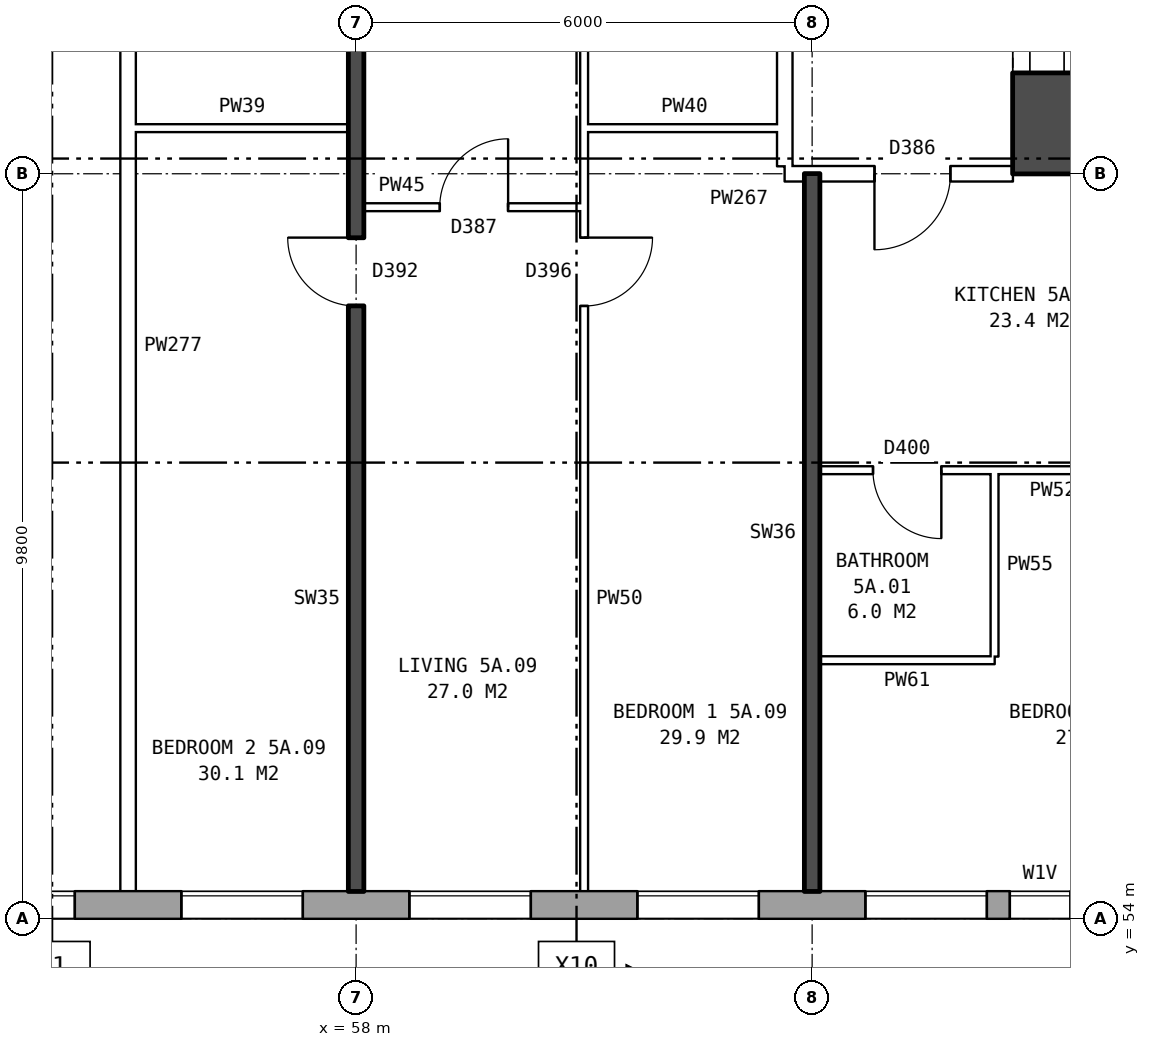
"""IFC4 building model, lengths in metres.
Left out: names, types, materials, properties, quantities, classifications, styles, units other than length and angle.
Written with IfcOpenShell. Run it as: python <this file> out.ifc"""

import sys

from ifc_helpers import new_model, si_unit, direction, frame, frame_2d, origin, place, context, subcontext, project, spatial, rectangle, extrude, element, fill, save


model = new_model("IFC4")
c1 = context("Model", 3, precision=1e-05, world=origin(), true_north=direction((0.0, 1.0)))
c2 = subcontext(c1, "Body", "Model", "MODEL_VIEW")
j1 = project(units=[si_unit("LENGTHUNIT", "METRE"), si_unit("PLANEANGLEUNIT", "RADIAN")], contexts=[c1])
p1 = place(None, origin())
s1 = spatial("IfcSite", under=j1, at=p1, CompositionType="ELEMENT")
p2 = place(p1, origin())
s2 = spatial("IfcBuilding", under=s1, at=p2, CompositionType="ELEMENT")
p3 = place(p2, frame((0.0, 0.0, 22.6)))
s3 = spatial("IfcBuildingStorey", under=s2, at=p3, CompositionType="ELEMENT", Elevation=22.6)
p4 = place(p3, frame((22.825, 54.18, 0.0), z_axis=(0.0, 0.0, 1.0), x_axis=(1.0, 0.0, 0.0)))
e1 = element("IfcWall", 1, at=p4, inside=s3, PredefinedType="STANDARD", context=c2, shape_type="SweptSolid", body=[
    extrude(rectangle(XDim=50.101, YDim=0.36, at=frame_2d((25.05, 0.0))), origin(), (0.0, 0.0, 1.0), 2.85),
])
p5 = place(p4, frame((0.3, 0.0, 0.8)))
e2 = element("IfcOpeningElement", 2, at=p5, cuts=e1, PredefinedType="OPENING", context=c2, shape_type="SweptSolid", body=[
    extrude(rectangle(XDim=1.4, YDim=1.8, at=frame_2d((0.7, 0.9))), frame((0.0, 0.19, 0.0), z_axis=(0.0, -1.0, 0.0), x_axis=(1.0, 0.0, 0.0)), (0.0, 0.0, 1.0), 0.38),
])
p6 = place(p4, frame((5.475, 0.0, 0.8)))
e3 = element("IfcOpeningElement", 3, at=p6, cuts=e1, PredefinedType="OPENING", context=c2, shape_type="SweptSolid", body=[
    extrude(rectangle(XDim=1.2, YDim=0.9, at=frame_2d((0.6, 0.45))), frame((0.0, 0.19, 0.0), z_axis=(0.0, -1.0, 0.0), x_axis=(1.0, 0.0, 0.0)), (0.0, 0.0, 1.0), 0.38),
])
p7 = place(p4, frame((8.875, 0.0, 0.8)))
e4 = element("IfcOpeningElement", 4, at=p7, cuts=e1, PredefinedType="OPENING", context=c2, shape_type="SweptSolid", body=[
    extrude(rectangle(XDim=1.6, YDim=1.8, at=frame_2d((0.8, 0.9))), frame((0.0, 0.19, 0.0), z_axis=(0.0, -1.0, 0.0), x_axis=(1.0, 0.0, 0.0)), (0.0, 0.0, 1.0), 0.38),
])
p8 = place(p4, frame((11.875, 0.0, 0.8)))
e5 = element("IfcOpeningElement", 5, at=p8, cuts=e1, PredefinedType="OPENING", context=c2, shape_type="SweptSolid", body=[
    extrude(rectangle(XDim=1.6, YDim=1.8, at=frame_2d((0.8, 0.9))), frame((0.0, 0.19, 0.0), z_axis=(0.0, -1.0, 0.0), x_axis=(1.0, 0.0, 0.0)), (0.0, 0.0, 1.0), 0.38),
])
p9 = place(p4, frame((14.875, 0.0, 0.8)))
e6 = element("IfcOpeningElement", 6, at=p9, cuts=e1, PredefinedType="OPENING", context=c2, shape_type="SweptSolid", body=[
    extrude(rectangle(XDim=1.6, YDim=1.8, at=frame_2d((0.8, 0.9))), frame((0.0, 0.19, 0.0), z_axis=(0.0, -1.0, 0.0), x_axis=(1.0, 0.0, 0.0)), (0.0, 0.0, 1.0), 0.38),
])
p10 = place(p4, frame((17.875, 0.0, 0.8)))
e7 = element("IfcOpeningElement", 7, at=p10, cuts=e1, PredefinedType="OPENING", context=c2, shape_type="SweptSolid", body=[
    extrude(rectangle(XDim=1.6, YDim=1.8, at=frame_2d((0.8, 0.9))), frame((0.0, 0.19, 0.0), z_axis=(0.0, -1.0, 0.0), x_axis=(1.0, 0.0, 0.0)), (0.0, 0.0, 1.0), 0.38),
])
p11 = place(p4, frame((20.875, 0.0, 0.8)))
e8 = element("IfcOpeningElement", 8, at=p11, cuts=e1, PredefinedType="OPENING", context=c2, shape_type="SweptSolid", body=[
    extrude(rectangle(XDim=1.6, YDim=1.8, at=frame_2d((0.8, 0.9))), frame((0.0, 0.19, 0.0), z_axis=(0.0, -1.0, 0.0), x_axis=(1.0, 0.0, 0.0)), (0.0, 0.0, 1.0), 0.38),
])
p12 = place(p4, frame((23.875, 0.0, 0.8)))
e9 = element("IfcOpeningElement", 9, at=p12, cuts=e1, PredefinedType="OPENING", context=c2, shape_type="SweptSolid", body=[
    extrude(rectangle(XDim=1.6, YDim=1.8, at=frame_2d((0.8, 0.9))), frame((0.0, 0.19, 0.0), z_axis=(0.0, -1.0, 0.0), x_axis=(1.0, 0.0, 0.0)), (0.0, 0.0, 1.0), 0.38),
])
p13 = place(p4, frame((26.875, 0.0, 0.8)))
e10 = element("IfcOpeningElement", 10, at=p13, cuts=e1, PredefinedType="OPENING", context=c2, shape_type="SweptSolid", body=[
    extrude(rectangle(XDim=1.6, YDim=1.8, at=frame_2d((0.8, 0.9))), frame((0.0, 0.19, 0.0), z_axis=(0.0, -1.0, 0.0), x_axis=(1.0, 0.0, 0.0)), (0.0, 0.0, 1.0), 0.38),
])
p14 = place(p4, frame((29.875, 0.0, 0.8)))
e11 = element("IfcOpeningElement", 11, at=p14, cuts=e1, PredefinedType="OPENING", context=c2, shape_type="SweptSolid", body=[
    extrude(rectangle(XDim=1.6, YDim=1.8, at=frame_2d((0.8, 0.9))), frame((0.0, 0.19, 0.0), z_axis=(0.0, -1.0, 0.0), x_axis=(1.0, 0.0, 0.0)), (0.0, 0.0, 1.0), 0.38),
])
p15 = place(p4, frame((32.875, 0.0, 0.8)))
e12 = element("IfcOpeningElement", 12, at=p15, cuts=e1, PredefinedType="OPENING", context=c2, shape_type="SweptSolid", body=[
    extrude(rectangle(XDim=1.6, YDim=1.8, at=frame_2d((0.8, 0.9))), frame((0.0, 0.19, 0.0), z_axis=(0.0, -1.0, 0.0), x_axis=(1.0, 0.0, 0.0)), (0.0, 0.0, 1.0), 0.38),
])
p16 = place(p4, frame((35.875, 0.0, 0.8)))
e13 = element("IfcOpeningElement", 13, at=p16, cuts=e1, PredefinedType="OPENING", context=c2, shape_type="SweptSolid", body=[
    extrude(rectangle(XDim=1.6, YDim=1.8, at=frame_2d((0.8, 0.9))), frame((0.0, 0.19, 0.0), z_axis=(0.0, -1.0, 0.0), x_axis=(1.0, 0.0, 0.0)), (0.0, 0.0, 1.0), 0.38),
])
p17 = place(p4, frame((38.875, 0.0, 0.8)))
e14 = element("IfcOpeningElement", 14, at=p17, cuts=e1, PredefinedType="OPENING", context=c2, shape_type="SweptSolid", body=[
    extrude(rectangle(XDim=1.6, YDim=1.8, at=frame_2d((0.8, 0.9))), frame((0.0, 0.19, 0.0), z_axis=(0.0, -1.0, 0.0), x_axis=(1.0, 0.0, 0.0)), (0.0, 0.0, 1.0), 0.38),
])
p18 = place(p4, frame((41.875, 0.0, 0.8)))
e15 = element("IfcOpeningElement", 15, at=p18, cuts=e1, PredefinedType="OPENING", context=c2, shape_type="SweptSolid", body=[
    extrude(rectangle(XDim=1.6, YDim=1.8, at=frame_2d((0.8, 0.9))), frame((0.0, 0.19, 0.0), z_axis=(0.0, -1.0, 0.0), x_axis=(1.0, 0.0, 0.0)), (0.0, 0.0, 1.0), 0.38),
])
p19 = place(p4, frame((43.775, 0.0, 0.8)))
e16 = element("IfcOpeningElement", 16, at=p19, cuts=e1, PredefinedType="OPENING", context=c2, shape_type="SweptSolid", body=[
    extrude(rectangle(XDim=0.8, YDim=0.9, at=frame_2d((0.4, 0.45))), frame((0.0, 0.19, 0.0), z_axis=(0.0, -1.0, 0.0), x_axis=(1.0, 0.0, 0.0)), (0.0, 0.0, 1.0), 0.38),
])
p20 = place(p4, frame((47.875, 0.0, 0.8)))
e17 = element("IfcOpeningElement", 17, at=p20, cuts=e1, PredefinedType="OPENING", context=c2, shape_type="SweptSolid", body=[
    extrude(rectangle(XDim=1.6, YDim=1.8, at=frame_2d((0.8, 0.9))), frame((0.0, 0.19, 0.0), z_axis=(0.0, -1.0, 0.0), x_axis=(1.0, 0.0, 0.0)), (0.0, 0.0, 1.0), 0.38),
])
p21 = place(p4, frame((2.0, 0.0, 0.9)))
e18 = element("IfcOpeningElement", 18, at=p21, cuts=e1, PredefinedType="OPENING", context=c2, shape_type="SweptSolid", body=[
    extrude(rectangle(XDim=0.8, YDim=1.5, at=frame_2d((0.4, 0.75))), frame((0.0, 0.19, 0.0), z_axis=(0.0, -1.0, 0.0), x_axis=(1.0, 0.0, 0.0)), (0.0, 0.0, 1.0), 0.38),
])
p22 = place(p4, frame((6.975, 0.0, 0.8)))
e19 = element("IfcOpeningElement", 19, at=p22, cuts=e1, PredefinedType="OPENING", context=c2, shape_type="SweptSolid", body=[
    extrude(rectangle(XDim=1.4, YDim=1.8, at=frame_2d((0.7, 0.9))), frame((0.0, 0.19, 0.0), z_axis=(0.0, -1.0, 0.0), x_axis=(1.0, 0.0, 0.0)), (0.0, 0.0, 1.0), 0.38),
])
p23 = place(p4, frame((46.075, 0.0, 1.7)))
e20 = element("IfcOpeningElement", 20, at=p23, cuts=e1, PredefinedType="OPENING", context=c2, shape_type="SweptSolid", body=[
    extrude(rectangle(XDim=0.8, YDim=0.9, at=frame_2d((0.4, 0.45))), frame((0.0, 0.19, 0.0), z_axis=(0.0, -1.0, 0.0), x_axis=(1.0, 0.0, 0.0)), (0.0, 0.0, 1.0), 0.38),
])
p24 = place(p3, frame((67.09, 64.7, 0.0), z_axis=(0.0, 0.0, 1.0), x_axis=(0.0, 1.0, 0.0)))
e21 = element("IfcWall", 21, at=p24, inside=s3, PredefinedType="SHEAR", context=c2, shape_type="SweptSolid", body=[
    extrude(rectangle(XDim=10.6, YDim=0.9, at=frame_2d((5.3, 0.0))), origin(), (0.0, 0.0, 1.0), 2.85),
])
p25 = place(p24, frame((0.425, 0.0, 0.0)))
e22 = element("IfcOpeningElement", 22, at=p25, cuts=e21, PredefinedType="OPENING", context=c2, shape_type="SweptSolid", body=[
    extrude(rectangle(XDim=1.1, YDim=2.1, at=frame_2d((0.55, 1.05))), frame((0.0, 0.46, 0.0), z_axis=(0.0, -1.0, 0.0), x_axis=(1.0, 0.0, 0.0)), (0.0, 0.0, 1.0), 0.92),
])
p26 = place(p24, frame((9.0, 0.0, 0.0)))
e23 = element("IfcOpeningElement", 23, at=p26, cuts=e21, PredefinedType="OPENING", context=c2, shape_type="SweptSolid", body=[
    extrude(rectangle(XDim=1.1, YDim=2.1, at=frame_2d((0.55, 1.05))), frame((0.0, 0.46, 0.0), z_axis=(0.0, -1.0, 0.0), x_axis=(1.0, 0.0, 0.0)), (0.0, 0.0, 1.0), 0.92),
])
p27 = place(p3, frame((66.64, 64.25, 0.0), z_axis=(0.0, 0.0, 1.0), x_axis=(1.0, 0.0, 0.0)))
e24 = element("IfcWall", 24, at=p27, inside=s3, PredefinedType="SHEAR", context=c2, shape_type="SweptSolid", body=[
    extrude(rectangle(XDim=9.0, YDim=0.9, at=frame_2d((4.5, 0.0))), origin(), (0.0, 0.0, 1.0), 2.85),
])
p28 = place(p3, frame((63.64, 63.9, 0.0), z_axis=(0.0, 0.0, 1.0), x_axis=(0.0, 1.0, 0.0)))
e25 = element("IfcWall", 25, at=p28, inside=s3, PredefinedType="PARTITIONING", context=c2, shape_type="SweptSolid", body=[
    extrude(rectangle(XDim=12.2, YDim=0.2, at=frame_2d((6.1, 0.0))), origin(), (0.0, 0.0, 1.0), 2.85),
])
p29 = place(p28, frame((5.1, 0.0, 0.0)))
e26 = element("IfcOpeningElement", 26, at=p29, cuts=e25, PredefinedType="OPENING", context=c2, shape_type="SweptSolid", body=[
    extrude(rectangle(XDim=2.0, YDim=2.1, at=frame_2d((1.0, 1.05))), frame((0.0, 0.11, 0.0), z_axis=(0.0, -1.0, 0.0), x_axis=(1.0, 0.0, 0.0)), (0.0, 0.0, 1.0), 0.22),
])
p30 = place(p3, frame((64.1, 57.4, 0.0), z_axis=(0.0, 0.0, 1.0), x_axis=(1.0, 0.0, 0.0)))
e27 = element("IfcWall", 27, at=p30, inside=s3, PredefinedType="PARTITIONING", context=c2, shape_type="SweptSolid", body=[
    extrude(rectangle(XDim=2.3, YDim=0.1, at=frame_2d((1.15, 0.0))), origin(), (0.0, 0.0, 1.0), 2.85),
])
p31 = place(p3, frame((64.1, 59.9, 0.0), z_axis=(0.0, 0.0, 1.0), x_axis=(1.0, 0.0, 0.0)))
e28 = element("IfcWall", 28, at=p31, inside=s3, PredefinedType="PARTITIONING", context=c2, shape_type="SweptSolid", body=[
    extrude(rectangle(XDim=5.8, YDim=0.1, at=frame_2d((2.9, 0.0))), origin(), (0.0, 0.0, 1.0), 2.85),
])
p32 = place(p31, frame((3.6, 0.0, 0.0)))
e29 = element("IfcOpeningElement", 29, at=p32, cuts=e28, PredefinedType="OPENING", context=c2, shape_type="SweptSolid", body=[
    extrude(rectangle(XDim=0.9, YDim=2.1, at=frame_2d((0.45, 1.05))), frame((0.0, 0.06, 0.0), z_axis=(0.0, -1.0, 0.0), x_axis=(1.0, 0.0, 0.0)), (0.0, 0.0, 1.0), 0.12),
])
p33 = place(p31, frame((0.7, 0.0, 0.0)))
e30 = element("IfcOpeningElement", 30, at=p33, cuts=e28, PredefinedType="OPENING", context=c2, shape_type="SweptSolid", body=[
    extrude(rectangle(XDim=0.9, YDim=2.1, at=frame_2d((0.45, 1.05))), frame((0.0, 0.06, 0.0), z_axis=(0.0, -1.0, 0.0), x_axis=(1.0, 0.0, 0.0)), (0.0, 0.0, 1.0), 0.12),
])
p34 = place(p3, frame((58.1, 63.36, 0.0), z_axis=(0.0, 0.0, 1.0), x_axis=(1.0, 0.0, 0.0)))
e31 = element("IfcWall", 31, at=p34, inside=s3, PredefinedType="PARTITIONING", context=c2, shape_type="SweptSolid", body=[
    extrude(rectangle(XDim=2.9, YDim=0.1, at=frame_2d((1.45, 0.0))), origin(), (0.0, 0.0, 1.0), 2.85),
])
p35 = place(p34, frame((1.0, 0.0, 0.0)))
e32 = element("IfcOpeningElement", 32, at=p35, cuts=e31, PredefinedType="OPENING", context=c2, shape_type="SweptSolid", body=[
    extrude(rectangle(XDim=0.9, YDim=2.1, at=frame_2d((0.45, 1.05))), frame((0.0, 0.06, 0.0), z_axis=(0.0, -1.0, 0.0), x_axis=(1.0, 0.0, 0.0)), (0.0, 0.0, 1.0), 0.12),
])
p36 = place(p3, frame((63.64, 63.8, 0.0), z_axis=(0.0, 0.0, 1.0), x_axis=(1.0, 0.0, 0.0)))
e33 = element("IfcWall", 33, at=p36, inside=s3, PredefinedType="PARTITIONING", context=c2, shape_type="SweptSolid", body=[
    extrude(rectangle(XDim=3.0, YDim=0.2, at=frame_2d((1.5, 0.0))), origin(), (0.0, 0.0, 1.0), 2.85),
])
p37 = place(p36, frame((1.18, 0.0, 0.0)))
e34 = element("IfcOpeningElement", 34, at=p37, cuts=e33, PredefinedType="OPENING", context=c2, shape_type="SweptSolid", body=[
    extrude(rectangle(XDim=1.0, YDim=2.1, at=frame_2d((0.5, 1.05))), frame((0.0, 0.11, 0.0), z_axis=(0.0, -1.0, 0.0), x_axis=(1.0, 0.0, 0.0)), (0.0, 0.0, 1.0), 0.22),
])
p38 = place(p3, frame((55.1, 64.4, 0.0), z_axis=(0.0, 0.0, 1.0), x_axis=(1.0, 0.0, 0.0)))
e35 = element("IfcWall", 35, at=p38, inside=s3, PredefinedType="PARTITIONING", context=c2, shape_type="SweptSolid", body=[
    extrude(rectangle(XDim=2.8, YDim=0.1, at=frame_2d((1.4, 0.0))), origin(), (0.0, 0.0, 1.0), 2.85),
])
p39 = place(p3, frame((61.0, 64.4, 0.0), z_axis=(0.0, 0.0, 1.0), x_axis=(1.0, 0.0, 0.0)))
e36 = element("IfcWall", 36, at=p39, inside=s3, PredefinedType="PARTITIONING", context=c2, shape_type="SweptSolid", body=[
    extrude(rectangle(XDim=2.64, YDim=0.1, at=frame_2d((1.32, 0.0))), origin(), (0.0, 0.0, 1.0), 2.85),
])
p40 = place(p3, frame((55.0, 54.36, 0.0), z_axis=(0.0, 0.0, 1.0), x_axis=(0.0, 1.0, 0.0)))
e37 = element("IfcWall", 37, at=p40, inside=s3, PredefinedType="PARTITIONING", context=c2, shape_type="SweptSolid", body=[
    extrude(rectangle(XDim=14.34, YDim=0.2, at=frame_2d((7.17, 0.0))), origin(), (0.0, 0.0, 1.0), 2.85),
])
p41 = place(p3, frame((58.0, 54.36, 0.0), z_axis=(0.0, 0.0, 1.0), x_axis=(0.0, 1.0, 0.0)))
e38 = element("IfcWall", 38, at=p41, inside=s3, PredefinedType="SOLIDWALL", context=c2, shape_type="SweptSolid", body=[
    extrude(rectangle(XDim=14.44, YDim=0.2, at=frame_2d((7.22, 0.0))), origin(), (0.0, 0.0, 1.0), 2.85),
])
p42 = place(p41, frame((7.7, 0.0, 0.0)))
e39 = element("IfcOpeningElement", 39, at=p42, cuts=e38, PredefinedType="OPENING", context=c2, shape_type="SweptSolid", body=[
    extrude(rectangle(XDim=0.9, YDim=2.1, at=frame_2d((0.45, 1.05))), frame((0.0, 0.11, 0.0), z_axis=(0.0, -1.0, 0.0), x_axis=(1.0, 0.0, 0.0)), (0.0, 0.0, 1.0), 0.22),
])
p43 = place(p41, frame((13.14, 0.0, 0.0)))
e40 = element("IfcOpeningElement", 40, at=p43, cuts=e38, PredefinedType="OPENING", context=c2, shape_type="SweptSolid", body=[
    extrude(rectangle(XDim=0.9, YDim=2.1, at=frame_2d((0.45, 1.05))), frame((0.0, 0.11, 0.0), z_axis=(0.0, -1.0, 0.0), x_axis=(1.0, 0.0, 0.0)), (0.0, 0.0, 1.0), 0.22),
])
p44 = place(p3, frame((61.0, 54.36, 0.0), z_axis=(0.0, 0.0, 1.0), x_axis=(0.0, 1.0, 0.0)))
e41 = element("IfcWall", 41, at=p44, inside=s3, PredefinedType="PARTITIONING", context=c2, shape_type="SweptSolid", body=[
    extrude(rectangle(XDim=14.34, YDim=0.1, at=frame_2d((7.17, 0.0))), origin(), (0.0, 0.0, 1.0), 2.85),
])
p45 = place(p44, frame((7.7, 0.0, 0.0)))
e42 = element("IfcOpeningElement", 42, at=p45, cuts=e41, PredefinedType="OPENING", context=c2, shape_type="SweptSolid", body=[
    extrude(rectangle(XDim=0.9, YDim=2.1, at=frame_2d((0.45, 1.05))), frame((0.0, 0.06, 0.0), z_axis=(0.0, -1.0, 0.0), x_axis=(1.0, 0.0, 0.0)), (0.0, 0.0, 1.0), 0.12),
])
p46 = place(p44, frame((13.04, 0.0, 0.0)))
e43 = element("IfcOpeningElement", 43, at=p46, cuts=e41, PredefinedType="OPENING", context=c2, shape_type="SweptSolid", body=[
    extrude(rectangle(XDim=0.9, YDim=2.1, at=frame_2d((0.45, 1.05))), frame((0.0, 0.06, 0.0), z_axis=(0.0, -1.0, 0.0), x_axis=(1.0, 0.0, 0.0)), (0.0, 0.0, 1.0), 0.12),
])
p47 = place(p3, frame((64.0, 54.36, 0.0), z_axis=(0.0, 0.0, 1.0), x_axis=(0.0, 1.0, 0.0)))
e44 = element("IfcWall", 44, at=p47, inside=s3, PredefinedType="SOLIDWALL", context=c2, shape_type="SweptSolid", body=[
    extrude(rectangle(XDim=9.44, YDim=0.2, at=frame_2d((4.72, 0.0))), origin(), (0.0, 0.0, 1.0), 2.85),
])
p48 = place(p3, frame((66.4, 57.45, 0.0), z_axis=(0.0, 0.0, 1.0), x_axis=(0.0, 1.0, 0.0)))
e45 = element("IfcWall", 45, at=p48, inside=s3, PredefinedType="PARTITIONING", context=c2, shape_type="SweptSolid", body=[
    extrude(rectangle(XDim=2.4, YDim=0.1, at=frame_2d((1.2, 0.0))), origin(), (0.0, 0.0, 1.0), 2.85),
])
p49 = place(p14, origin())
e46 = element("IfcWindow", 46, at=p49, inside=s3, PartitioningType="SINGLE_PANEL", PredefinedType="WINDOW", context=c2, shape_type="SweptSolid", body=[
    extrude(rectangle(XDim=1.6, YDim=1.8, at=frame_2d((0.8, 0.9))), frame((0.0, 0.15, 0.0), z_axis=(0.0, -1.0, 0.0), x_axis=(1.0, 0.0, 0.0)), (0.0, 0.0, 1.0), 0.06),
])
fill(e11, e46)
p50 = place(p15, origin())
e47 = element("IfcWindow", 47, at=p50, inside=s3, PartitioningType="SINGLE_PANEL", PredefinedType="WINDOW", context=c2, shape_type="SweptSolid", body=[
    extrude(rectangle(XDim=1.6, YDim=1.8, at=frame_2d((0.8, 0.9))), frame((0.0, 0.15, 0.0), z_axis=(0.0, -1.0, 0.0), x_axis=(1.0, 0.0, 0.0)), (0.0, 0.0, 1.0), 0.06),
])
fill(e12, e47)
p51 = place(p16, origin())
e48 = element("IfcWindow", 48, at=p51, inside=s3, PartitioningType="SINGLE_PANEL", PredefinedType="WINDOW", context=c2, shape_type="SweptSolid", body=[
    extrude(rectangle(XDim=1.6, YDim=1.8, at=frame_2d((0.8, 0.9))), frame((0.0, 0.15, 0.0), z_axis=(0.0, -1.0, 0.0), x_axis=(1.0, 0.0, 0.0)), (0.0, 0.0, 1.0), 0.06),
])
fill(e13, e48)
p52 = place(p17, origin())
e49 = element("IfcWindow", 49, at=p52, inside=s3, PartitioningType="SINGLE_PANEL", PredefinedType="WINDOW", context=c2, shape_type="SweptSolid", body=[
    extrude(rectangle(XDim=1.6, YDim=1.8, at=frame_2d((0.8, 0.9))), frame((0.0, 0.15, 0.0), z_axis=(0.0, -1.0, 0.0), x_axis=(1.0, 0.0, 0.0)), (0.0, 0.0, 1.0), 0.06),
])
fill(e14, e49)
p53 = place(p18, origin())
e50 = element("IfcWindow", 50, at=p53, inside=s3, PartitioningType="SINGLE_PANEL", PredefinedType="WINDOW", context=c2, shape_type="SweptSolid", body=[
    extrude(rectangle(XDim=1.6, YDim=1.8, at=frame_2d((0.8, 0.9))), frame((0.0, 0.15, 0.0), z_axis=(0.0, -1.0, 0.0), x_axis=(1.0, 0.0, 0.0)), (0.0, 0.0, 1.0), 0.06),
])
fill(e15, e50)
p54 = place(p19, origin())
e51 = element("IfcWindow", 51, at=p54, inside=s3, PartitioningType="SINGLE_PANEL", PredefinedType="WINDOW", context=c2, shape_type="SweptSolid", body=[
    extrude(rectangle(XDim=0.8, YDim=0.9, at=frame_2d((0.4, 0.45))), frame((0.0, 0.15, 0.0), z_axis=(0.0, -1.0, 0.0), x_axis=(1.0, 0.0, 0.0)), (0.0, 0.0, 1.0), 0.06),
])
fill(e16, e51)
p55 = place(p37, frame((1.0, 0.0, 0.0), z_axis=(0.0, 0.0, 1.0), x_axis=(-1.0, 0.0, 0.0)))
e52 = element("IfcDoor", 52, at=p55, inside=s3, OperationType="SINGLE_SWING_RIGHT", PredefinedType="DOOR", context=c2, shape_type="SweptSolid", body=[
    extrude(rectangle(XDim=1.0, YDim=2.1, at=frame_2d((0.5, 1.05))), frame((0.0, 0.025, 0.0), z_axis=(0.0, -1.0, 0.0), x_axis=(1.0, 0.0, 0.0)), (0.0, 0.0, 1.0), 0.05),
])
fill(e34, e52)
p56 = place(p33, frame((0.9, 0.0, 0.0), z_axis=(0.0, 0.0, 1.0), x_axis=(-1.0, 0.0, 0.0)))
e53 = element("IfcDoor", 53, at=p56, inside=s3, OperationType="SINGLE_SWING_LEFT", PredefinedType="DOOR", context=c2, shape_type="SweptSolid", body=[
    extrude(rectangle(XDim=0.9, YDim=2.1, at=frame_2d((0.45, 1.05))), frame((0.0, 0.025, 0.0), z_axis=(0.0, -1.0, 0.0), x_axis=(1.0, 0.0, 0.0)), (0.0, 0.0, 1.0), 0.05),
])
fill(e30, e53)
p57 = place(p45, frame((0.9, 0.0, 0.0), z_axis=(0.0, 0.0, 1.0), x_axis=(-1.0, 0.0, 0.0)))
e54 = element("IfcDoor", 54, at=p57, inside=s3, OperationType="SINGLE_SWING_LEFT", PredefinedType="DOOR", context=c2, shape_type="SweptSolid", body=[
    extrude(rectangle(XDim=0.9, YDim=2.1, at=frame_2d((0.45, 1.05))), frame((0.0, 0.025, 0.0), z_axis=(0.0, -1.0, 0.0), x_axis=(1.0, 0.0, 0.0)), (0.0, 0.0, 1.0), 0.05),
])
fill(e42, e54)
p58 = place(p42, origin())
e55 = element("IfcDoor", 55, at=p58, inside=s3, OperationType="SINGLE_SWING_RIGHT", PredefinedType="DOOR", context=c2, shape_type="SweptSolid", body=[
    extrude(rectangle(XDim=0.9, YDim=2.1, at=frame_2d((0.45, 1.05))), frame((0.0, 0.025, 0.0), z_axis=(0.0, -1.0, 0.0), x_axis=(1.0, 0.0, 0.0)), (0.0, 0.0, 1.0), 0.05),
])
fill(e39, e55)
p59 = place(p35, origin())
e56 = element("IfcDoor", 56, at=p59, inside=s3, OperationType="SINGLE_SWING_RIGHT", PredefinedType="DOOR", context=c2, shape_type="SweptSolid", body=[
    extrude(rectangle(XDim=0.9, YDim=2.1, at=frame_2d((0.45, 1.05))), frame((0.0, 0.025, 0.0), z_axis=(0.0, -1.0, 0.0), x_axis=(1.0, 0.0, 0.0)), (0.0, 0.0, 1.0), 0.05),
])
fill(e32, e56)
save(model, sys.argv[1])
